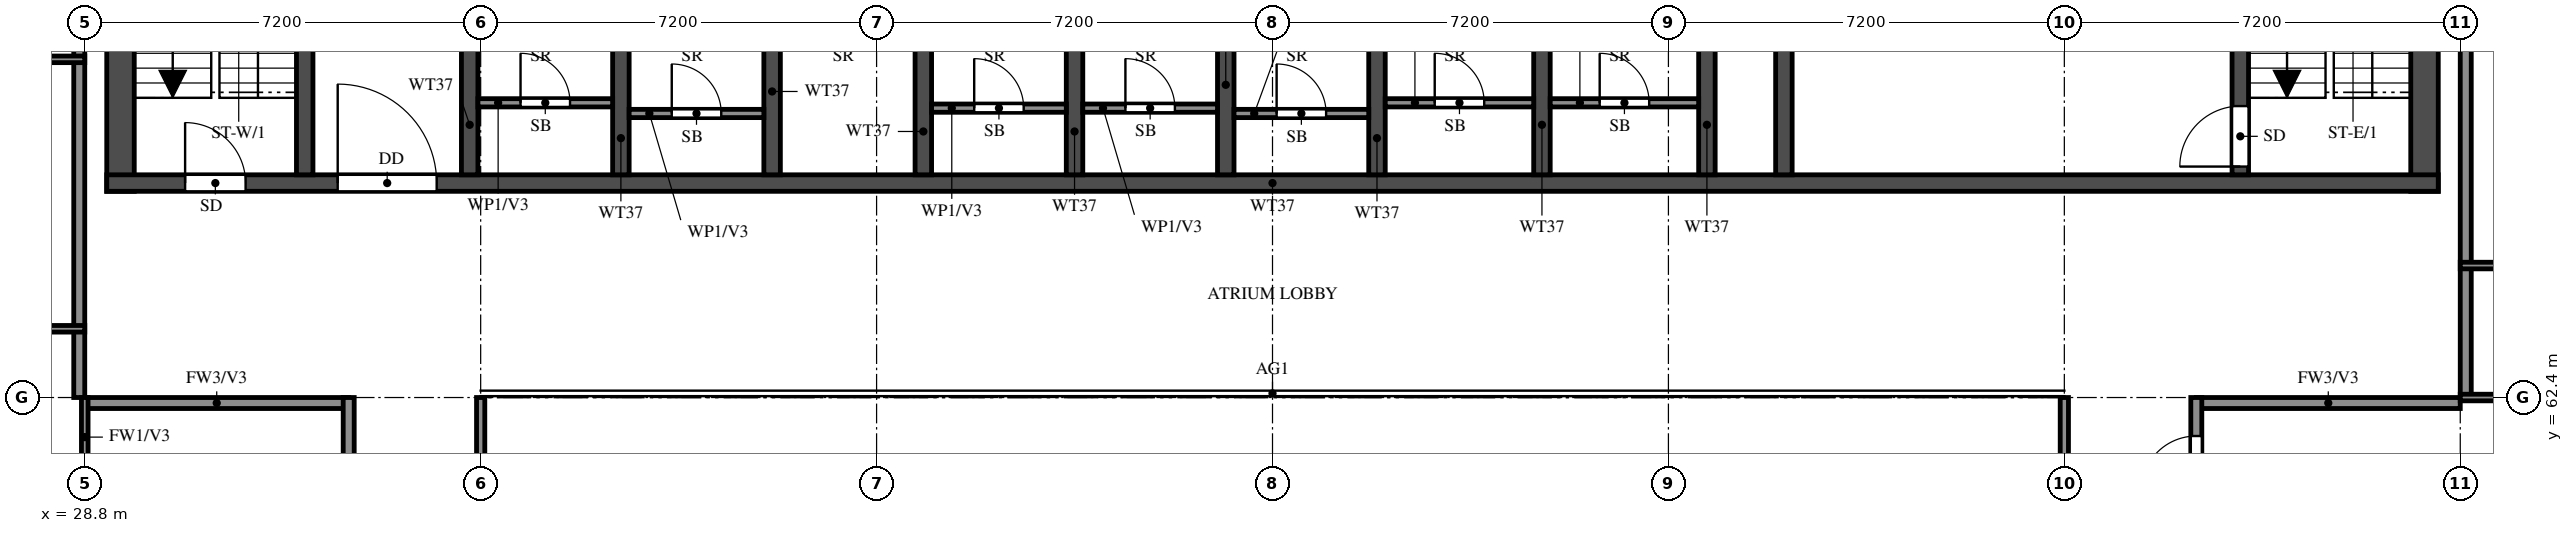
"""IFC4 building model, lengths in metres.
Left out: names, types, materials, properties, quantities, classifications, styles, units other than length and angle.
Written with IfcOpenShell. Run it as: python <this file> out.ifc"""

import sys

from ifc_helpers import new_model, si_unit, direction, frame, frame_2d, origin, place, context, subcontext, project, spatial, rectangle, extrude, element, fill, save


model = new_model("IFC4")
c1 = context("Model", 3, precision=1e-05, world=origin(), true_north=direction((0.0, 1.0)))
c2 = subcontext(c1, "Body", "Model", "MODEL_VIEW")
j1 = project(units=[si_unit("LENGTHUNIT", "METRE"), si_unit("PLANEANGLEUNIT", "RADIAN")], contexts=[c1])
p1 = place(None, origin())
s1 = spatial("IfcSite", under=j1, at=p1, CompositionType="ELEMENT")
p2 = place(p1, origin())
s2 = spatial("IfcBuilding", under=s1, at=p2, CompositionType="ELEMENT")
p3 = place(p2, frame((0.0, 0.0, 236.0)))
s3 = spatial("IfcBuildingStorey", under=s2, at=p3, CompositionType="ELEMENT", Elevation=236.0)
for number, where, z_axis, x_axis in (
    (1, (29.45, 66.15, 0.0), (0.0, 0.0, 1.0), (0.0, 1.0, 0.0)),
    (2, (71.35, 66.15, 0.0), (0.0, 0.0, 1.0), (0.0, 1.0, 0.0)),
):
    element("IfcWall", number, at=place(p3, frame(where, z_axis=z_axis, x_axis=x_axis)), inside=s3, PredefinedType="SHEAR", context=c2, shape_type="SweptSolid", body=[
        extrude(rectangle(XDim=11.85, YDim=0.5, at=frame_2d((5.925, 0.0))), origin(), (0.0, 0.0, 1.0), 3.22),
    ])
p4 = place(p3, frame((29.2, 66.3, 0.0), z_axis=(0.0, 0.0, 1.0), x_axis=(1.0, 0.0, 0.0)))
e3 = element("IfcWall", 3, at=p4, inside=s3, PredefinedType="SHEAR", context=c2, shape_type="SweptSolid", body=[
    extrude(rectangle(XDim=42.4, YDim=0.3, at=frame_2d((21.2, 0.0))), origin(), (0.0, 0.0, 1.0), 3.22),
])
p5 = place(p4, frame((1.425, 0.0, 0.0)))
e4 = element("IfcOpeningElement", 4, at=p5, cuts=e3, PredefinedType="OPENING", context=c2, shape_type="SweptSolid", body=[
    extrude(rectangle(XDim=1.1, YDim=2.1, at=frame_2d((0.55, 1.05))), frame((0.0, 0.16, 0.0), z_axis=(0.0, -1.0, 0.0), x_axis=(1.0, 0.0, 0.0)), (0.0, 0.0, 1.0), 0.32),
])
p6 = place(p4, frame((4.2, 0.0, 0.0)))
e5 = element("IfcOpeningElement", 5, at=p6, cuts=e3, PredefinedType="OPENING", context=c2, shape_type="SweptSolid", body=[
    extrude(rectangle(XDim=1.8, YDim=2.1, at=frame_2d((0.9, 1.05))), frame((0.0, 0.16, 0.0), z_axis=(0.0, -1.0, 0.0), x_axis=(1.0, 0.0, 0.0)), (0.0, 0.0, 1.0), 0.32),
])
p7 = place(p3, frame((32.8, 66.45, 0.0), z_axis=(0.0, 0.0, 1.0), x_axis=(0.0, 1.0, 0.0)))
e6 = element("IfcWall", 6, at=p7, inside=s3, PredefinedType="SHEAR", context=c2, shape_type="SweptSolid", body=[
    extrude(rectangle(XDim=11.05, YDim=0.3, at=frame_2d((5.525, 0.0))), origin(), (0.0, 0.0, 1.0), 3.22),
])
p8 = place(p3, frame((68.0, 66.45, 0.0), z_axis=(0.0, 0.0, 1.0), x_axis=(0.0, 1.0, 0.0)))
e7 = element("IfcWall", 7, at=p8, inside=s3, PredefinedType="SHEAR", context=c2, shape_type="SweptSolid", body=[
    extrude(rectangle(XDim=11.05, YDim=0.3, at=frame_2d((5.525, 0.0))), origin(), (0.0, 0.0, 1.0), 3.22),
])
p9 = place(p8, frame((0.15, 0.0, 0.0)))
e8 = element("IfcOpeningElement", 8, at=p9, cuts=e7, PredefinedType="OPENING", context=c2, shape_type="SweptSolid", body=[
    extrude(rectangle(XDim=1.1, YDim=2.1, at=frame_2d((0.55, 1.05))), frame((0.0, 0.16, 0.0), z_axis=(0.0, -1.0, 0.0), x_axis=(1.0, 0.0, 0.0)), (0.0, 0.0, 1.0), 0.32),
])
p10 = place(p3, frame((59.7, 66.45, 0.0), z_axis=(0.0, 0.0, 1.0), x_axis=(0.0, 1.0, 0.0)))
e9 = element("IfcWall", 9, at=p10, inside=s3, PredefinedType="SHEAR", context=c2, shape_type="SweptSolid", body=[
    extrude(rectangle(XDim=6.175, YDim=0.3, at=frame_2d((3.087, 0.0))), origin(), (0.0, 0.0, 1.0), 3.22),
])
p11 = place(p10, frame((3.85, 0.0, 0.0)))
e10 = element("IfcOpeningElement", 10, at=p11, cuts=e9, PredefinedType="OPENING", context=c2, shape_type="SweptSolid", body=[
    extrude(rectangle(XDim=1.2, YDim=2.1, at=frame_2d((0.6, 1.05))), frame((0.0, 0.16, 0.0), z_axis=(0.0, -1.0, 0.0), x_axis=(1.0, 0.0, 0.0)), (0.0, 0.0, 1.0), 0.32),
])
for number, where, z_axis, x_axis in (
    (11, (35.8, 66.45, 0.0), (0.0, 0.0, 1.0), (0.0, 1.0, 0.0)),
    (12, (38.55, 66.45, 0.0), (0.0, 0.0, 1.0), (0.0, 1.0, 0.0)),
    (13, (41.3, 66.45, 0.0), (0.0, 0.0, 1.0), (0.0, 1.0, 0.0)),
    (14, (44.05, 66.45, 0.0), (0.0, 0.0, 1.0), (0.0, 1.0, 0.0)),
    (15, (46.8, 66.45, 0.0), (0.0, 0.0, 1.0), (0.0, 1.0, 0.0)),
    (16, (49.55, 66.45, 0.0), (0.0, 0.0, 1.0), (0.0, 1.0, 0.0)),
    (17, (52.3, 66.45, 0.0), (0.0, 0.0, 1.0), (0.0, 1.0, 0.0)),
    (18, (55.3, 66.45, 0.0), (0.0, 0.0, 1.0), (0.0, 1.0, 0.0)),
    (19, (58.3, 66.45, 0.0), (0.0, 0.0, 1.0), (0.0, 1.0, 0.0)),
):
    element("IfcWall", number, at=place(p3, frame(where, z_axis=z_axis, x_axis=x_axis)), inside=s3, PredefinedType="SHEAR", context=c2, shape_type="SweptSolid", body=[
        extrude(rectangle(XDim=2.425, YDim=0.3, at=frame_2d((1.212, 0.0))), origin(), (0.0, 0.0, 1.0), 3.22),
    ])
p12 = place(p3, frame((35.95, 67.76, 0.0), z_axis=(0.0, 0.0, 1.0), x_axis=(1.0, 0.0, 0.0)))
e20 = element("IfcWall", 20, at=p12, inside=s3, PredefinedType="PARTITIONING", context=c2, shape_type="SweptSolid", body=[
    extrude(rectangle(XDim=2.45, YDim=0.15, at=frame_2d((1.225, 0.0))), origin(), (0.0, 0.0, 1.0), 3.22),
])
p13 = place(p12, frame((0.775, 0.0, 0.0)))
e21 = element("IfcOpeningElement", 21, at=p13, cuts=e20, PredefinedType="OPENING", context=c2, shape_type="SweptSolid", body=[
    extrude(rectangle(XDim=0.9, YDim=2.1, at=frame_2d((0.45, 1.05))), frame((0.0, 0.085, 0.0), z_axis=(0.0, -1.0, 0.0), x_axis=(1.0, 0.0, 0.0)), (0.0, 0.0, 1.0), 0.17),
])
p14 = place(p3, frame((38.7, 67.565, 0.0), z_axis=(0.0, 0.0, 1.0), x_axis=(1.0, 0.0, 0.0)))
e22 = element("IfcWall", 22, at=p14, inside=s3, PredefinedType="PARTITIONING", context=c2, shape_type="SweptSolid", body=[
    extrude(rectangle(XDim=2.45, YDim=0.15, at=frame_2d((1.225, 0.0))), origin(), (0.0, 0.0, 1.0), 3.22),
])
p15 = place(p14, frame((0.775, 0.0, 0.0)))
e23 = element("IfcOpeningElement", 23, at=p15, cuts=e22, PredefinedType="OPENING", context=c2, shape_type="SweptSolid", body=[
    extrude(rectangle(XDim=0.9, YDim=2.1, at=frame_2d((0.45, 1.05))), frame((0.0, 0.085, 0.0), z_axis=(0.0, -1.0, 0.0), x_axis=(1.0, 0.0, 0.0)), (0.0, 0.0, 1.0), 0.17),
])
p16 = place(p3, frame((44.2, 67.663, 0.0), z_axis=(0.0, 0.0, 1.0), x_axis=(1.0, 0.0, 0.0)))
e24 = element("IfcWall", 24, at=p16, inside=s3, PredefinedType="PARTITIONING", context=c2, shape_type="SweptSolid", body=[
    extrude(rectangle(XDim=2.45, YDim=0.15, at=frame_2d((1.225, 0.0))), origin(), (0.0, 0.0, 1.0), 3.22),
])
p17 = place(p16, frame((0.775, 0.0, 0.0)))
e25 = element("IfcOpeningElement", 25, at=p17, cuts=e24, PredefinedType="OPENING", context=c2, shape_type="SweptSolid", body=[
    extrude(rectangle(XDim=0.9, YDim=2.1, at=frame_2d((0.45, 1.05))), frame((0.0, 0.085, 0.0), z_axis=(0.0, -1.0, 0.0), x_axis=(1.0, 0.0, 0.0)), (0.0, 0.0, 1.0), 0.17),
])
p18 = place(p3, frame((46.95, 67.663, 0.0), z_axis=(0.0, 0.0, 1.0), x_axis=(1.0, 0.0, 0.0)))
e26 = element("IfcWall", 26, at=p18, inside=s3, PredefinedType="PARTITIONING", context=c2, shape_type="SweptSolid", body=[
    extrude(rectangle(XDim=2.45, YDim=0.15, at=frame_2d((1.225, 0.0))), origin(), (0.0, 0.0, 1.0), 3.22),
])
p19 = place(p18, frame((0.775, 0.0, 0.0)))
e27 = element("IfcOpeningElement", 27, at=p19, cuts=e26, PredefinedType="OPENING", context=c2, shape_type="SweptSolid", body=[
    extrude(rectangle(XDim=0.9, YDim=2.1, at=frame_2d((0.45, 1.05))), frame((0.0, 0.085, 0.0), z_axis=(0.0, -1.0, 0.0), x_axis=(1.0, 0.0, 0.0)), (0.0, 0.0, 1.0), 0.17),
])
p20 = place(p3, frame((49.7, 67.565, 0.0), z_axis=(0.0, 0.0, 1.0), x_axis=(1.0, 0.0, 0.0)))
e28 = element("IfcWall", 28, at=p20, inside=s3, PredefinedType="PARTITIONING", context=c2, shape_type="SweptSolid", body=[
    extrude(rectangle(XDim=2.45, YDim=0.15, at=frame_2d((1.225, 0.0))), origin(), (0.0, 0.0, 1.0), 3.22),
])
p21 = place(p20, frame((0.775, 0.0, 0.0)))
e29 = element("IfcOpeningElement", 29, at=p21, cuts=e28, PredefinedType="OPENING", context=c2, shape_type="SweptSolid", body=[
    extrude(rectangle(XDim=0.9, YDim=2.1, at=frame_2d((0.45, 1.05))), frame((0.0, 0.085, 0.0), z_axis=(0.0, -1.0, 0.0), x_axis=(1.0, 0.0, 0.0)), (0.0, 0.0, 1.0), 0.17),
])
p22 = place(p3, frame((52.45, 67.76, 0.0), z_axis=(0.0, 0.0, 1.0), x_axis=(1.0, 0.0, 0.0)))
e30 = element("IfcWall", 30, at=p22, inside=s3, PredefinedType="PARTITIONING", context=c2, shape_type="SweptSolid", body=[
    extrude(rectangle(XDim=2.7, YDim=0.15, at=frame_2d((1.35, 0.0))), origin(), (0.0, 0.0, 1.0), 3.22),
])
p23 = place(p22, frame((0.9, 0.0, 0.0)))
e31 = element("IfcOpeningElement", 31, at=p23, cuts=e30, PredefinedType="OPENING", context=c2, shape_type="SweptSolid", body=[
    extrude(rectangle(XDim=0.9, YDim=2.1, at=frame_2d((0.45, 1.05))), frame((0.0, 0.085, 0.0), z_axis=(0.0, -1.0, 0.0), x_axis=(1.0, 0.0, 0.0)), (0.0, 0.0, 1.0), 0.17),
])
p24 = place(p3, frame((55.45, 67.76, 0.0), z_axis=(0.0, 0.0, 1.0), x_axis=(1.0, 0.0, 0.0)))
e32 = element("IfcWall", 32, at=p24, inside=s3, PredefinedType="PARTITIONING", context=c2, shape_type="SweptSolid", body=[
    extrude(rectangle(XDim=2.7, YDim=0.15, at=frame_2d((1.35, 0.0))), origin(), (0.0, 0.0, 1.0), 3.22),
])
p25 = place(p24, frame((0.9, 0.0, 0.0)))
e33 = element("IfcOpeningElement", 33, at=p25, cuts=e32, PredefinedType="OPENING", context=c2, shape_type="SweptSolid", body=[
    extrude(rectangle(XDim=0.9, YDim=2.1, at=frame_2d((0.45, 1.05))), frame((0.0, 0.085, 0.0), z_axis=(0.0, -1.0, 0.0), x_axis=(1.0, 0.0, 0.0)), (0.0, 0.0, 1.0), 0.17),
])
for number, where, z_axis, x_axis in (
    (34, (28.8, 62.3, 0.0), (0.0, 0.0, 1.0), (1.0, 0.0, 0.0)),
    (35, (67.2, 62.3, 0.0), (0.0, 0.0, 1.0), (1.0, 0.0, 0.0)),
):
    element("IfcWall", number, at=place(p3, frame(where, z_axis=z_axis, x_axis=x_axis)), inside=s3, PredefinedType="SOLIDWALL", context=c2, shape_type="SweptSolid", body=[
        extrude(rectangle(XDim=4.8, YDim=0.2, at=frame_2d((2.4, 0.0))), origin(), (0.0, 0.0, 1.0), 3.22),
    ])
p26 = place(p3, frame((28.7, 62.4, 0.0), z_axis=(0.0, 0.0, 1.0), x_axis=(0.0, 1.0, 0.0)))
e36 = element("IfcWall", 36, at=p26, inside=s3, PredefinedType="SOLIDWALL", context=c2, shape_type="SweptSolid", body=[
    extrude(rectangle(XDim=15.6, YDim=0.2, at=frame_2d((7.8, 0.0))), origin(), (0.0, 0.0, 1.0), 3.22),
])
p27 = place(p3, frame((33.6, 50.4, 0.0), z_axis=(0.0, 0.0, 1.0), x_axis=(0.0, 1.0, 0.0)))
e37 = element("IfcWall", 37, at=p27, inside=s3, PredefinedType="SOLIDWALL", context=c2, shape_type="SweptSolid", body=[
    extrude(rectangle(XDim=12.0, YDim=0.2, at=frame_2d((6.0, 0.0))), origin(), (0.0, 0.0, 1.0), 3.22),
])
p28 = place(p27, frame((0.7, 0.0, 0.0)))
e38 = element("IfcOpeningElement", 38, at=p28, cuts=e37, PredefinedType="OPENING", context=c2, shape_type="SweptSolid", body=[
    extrude(rectangle(XDim=1.0, YDim=2.1, at=frame_2d((0.5, 1.05))), frame((0.0, 0.11, 0.0), z_axis=(0.0, -1.0, 0.0), x_axis=(1.0, 0.0, 0.0)), (0.0, 0.0, 1.0), 0.22),
])
p29 = place(p27, frame((9.7, 0.0, 0.0)))
e39 = element("IfcOpeningElement", 39, at=p29, cuts=e37, PredefinedType="OPENING", context=c2, shape_type="SweptSolid", body=[
    extrude(rectangle(XDim=1.0, YDim=2.1, at=frame_2d((0.5, 1.05))), frame((0.0, 0.11, 0.0), z_axis=(0.0, -1.0, 0.0), x_axis=(1.0, 0.0, 0.0)), (0.0, 0.0, 1.0), 0.22),
])
p30 = place(p3, frame((67.2, 45.6, 0.0), z_axis=(0.0, 0.0, 1.0), x_axis=(0.0, 1.0, 0.0)))
e40 = element("IfcWall", 40, at=p30, inside=s3, PredefinedType="SOLIDWALL", context=c2, shape_type="SweptSolid", body=[
    extrude(rectangle(XDim=16.8, YDim=0.2, at=frame_2d((8.4, 0.0))), origin(), (0.0, 0.0, 1.0), 3.22),
])
p31 = place(p30, frame((6.7, 0.0, 0.0)))
e41 = element("IfcOpeningElement", 41, at=p31, cuts=e40, PredefinedType="OPENING", context=c2, shape_type="SweptSolid", body=[
    extrude(rectangle(XDim=1.0, YDim=2.1, at=frame_2d((0.5, 1.05))), frame((0.0, 0.11, 0.0), z_axis=(0.0, -1.0, 0.0), x_axis=(1.0, 0.0, 0.0)), (0.0, 0.0, 1.0), 0.22),
])
p32 = place(p30, frame((15.1, 0.0, 0.0)))
e42 = element("IfcOpeningElement", 42, at=p32, cuts=e40, PredefinedType="OPENING", context=c2, shape_type="SweptSolid", body=[
    extrude(rectangle(XDim=1.0, YDim=2.1, at=frame_2d((0.5, 1.05))), frame((0.0, 0.11, 0.0), z_axis=(0.0, -1.0, 0.0), x_axis=(1.0, 0.0, 0.0)), (0.0, 0.0, 1.0), 0.22),
])
p33 = place(p30, frame((0.7, 0.0, 0.0)))
e43 = element("IfcOpeningElement", 43, at=p33, cuts=e40, PredefinedType="OPENING", context=c2, shape_type="SweptSolid", body=[
    extrude(rectangle(XDim=1.0, YDim=2.1, at=frame_2d((0.5, 1.05))), frame((0.0, 0.11, 0.0), z_axis=(0.0, -1.0, 0.0), x_axis=(1.0, 0.0, 0.0)), (0.0, 0.0, 1.0), 0.22),
])
p34 = place(p3, frame((72.1, 62.4, 0.0), z_axis=(0.0, 0.0, 1.0), x_axis=(0.0, 1.0, 0.0)))
e44 = element("IfcWall", 44, at=p34, inside=s3, PredefinedType="SOLIDWALL", context=c2, shape_type="SweptSolid", body=[
    extrude(rectangle(XDim=15.6, YDim=0.2, at=frame_2d((7.8, 0.0))), origin(), (0.0, 0.0, 1.0), 3.22),
])
p35 = place(p3, frame((72.0, 62.4, 0.0), z_axis=(0.0, 0.0, 1.0), x_axis=(1.0, 0.0, 0.0)))
e45 = element("IfcWall", 45, at=p35, inside=s3, PredefinedType="PARTITIONING", context=c2, shape_type="SweptSolid", body=[
    extrude(rectangle(XDim=2.4, YDim=0.12, at=frame_2d((1.2, 0.0))), origin(), (0.0, 0.0, 1.0), 3.22),
])
p36 = place(p35, frame((0.75, 0.0, 0.0)))
e46 = element("IfcOpeningElement", 46, at=p36, cuts=e45, PredefinedType="OPENING", context=c2, shape_type="SweptSolid", body=[
    extrude(rectangle(XDim=0.9, YDim=2.1, at=frame_2d((0.45, 1.05))), frame((0.0, 0.07, 0.0), z_axis=(0.0, -1.0, 0.0), x_axis=(1.0, 0.0, 0.0)), (0.0, 0.0, 1.0), 0.14),
])
for number, where, z_axis, x_axis in (
    (47, (25.3, 63.65, 0.0), (0.0, 0.0, 1.0), (1.0, 0.0, 0.0)),
    (48, (72.0, 64.8, 0.0), (0.0, 0.0, 1.0), (1.0, 0.0, 0.0)),
    (49, (25.3, 68.55, 0.0), (0.0, 0.0, 1.0), (1.0, 0.0, 0.0)),
):
    element("IfcWall", number, at=place(p3, frame(where, z_axis=z_axis, x_axis=x_axis)), inside=s3, PredefinedType="PARTITIONING", context=c2, shape_type="SweptSolid", body=[
        extrude(rectangle(XDim=3.5, YDim=0.12, at=frame_2d((1.75, 0.0))), origin(), (0.0, 0.0, 1.0), 3.22),
    ])
p37 = place(p3, frame((28.8, 58.8, 0.0), z_axis=(0.0, 0.0, 1.0), x_axis=(0.0, 1.0, 0.0)))
e50 = element("IfcWall", 50, at=p37, inside=s3, PredefinedType="PARTITIONING", context=c2, shape_type="SweptSolid", body=[
    extrude(rectangle(XDim=3.6, YDim=0.12, at=frame_2d((1.8, 0.0))), origin(), (0.0, 0.0, 1.0), 3.22),
])
p38 = place(p37, frame((0.75, 0.0, 0.0)))
e51 = element("IfcOpeningElement", 51, at=p38, cuts=e50, PredefinedType="OPENING", context=c2, shape_type="SweptSolid", body=[
    extrude(rectangle(XDim=0.9, YDim=2.1, at=frame_2d((0.45, 1.05))), frame((0.0, 0.07, 0.0), z_axis=(0.0, -1.0, 0.0), x_axis=(1.0, 0.0, 0.0)), (0.0, 0.0, 1.0), 0.14),
])
for number, where, z_axis, x_axis in (
    (52, (36.0, 48.0, 0.0), (0.0, 0.0, 1.0), (0.0, 1.0, 0.0)),
    (53, (64.8, 48.0, 0.0), (0.0, 0.0, 1.0), (0.0, 1.0, 0.0)),
):
    element("IfcWall", number, at=place(p3, frame(where, z_axis=z_axis, x_axis=x_axis)), inside=s3, PredefinedType="SOLIDWALL", context=c2, shape_type="SweptSolid", body=[
        extrude(rectangle(XDim=14.4, YDim=0.15, at=frame_2d((7.2, 0.0))), origin(), (0.0, 0.0, 1.0), 2.32),
    ])
p39 = place(p5, origin())
e54 = element("IfcDoor", 54, at=p39, inside=s3, OperationType="SINGLE_SWING_LEFT", PredefinedType="DOOR", context=c2, shape_type="SweptSolid", body=[
    extrude(rectangle(XDim=1.1, YDim=2.1, at=frame_2d((0.55, 1.05))), frame((0.0, 0.025, 0.0), z_axis=(0.0, -1.0, 0.0), x_axis=(1.0, 0.0, 0.0)), (0.0, 0.0, 1.0), 0.05),
])
fill(e4, e54)
p40 = place(p9, origin())
e55 = element("IfcDoor", 55, at=p40, inside=s3, OperationType="SINGLE_SWING_RIGHT", PredefinedType="DOOR", context=c2, shape_type="SweptSolid", body=[
    extrude(rectangle(XDim=1.1, YDim=2.1, at=frame_2d((0.55, 1.05))), frame((0.0, 0.025, 0.0), z_axis=(0.0, -1.0, 0.0), x_axis=(1.0, 0.0, 0.0)), (0.0, 0.0, 1.0), 0.05),
])
fill(e8, e55)
p41 = place(p6, origin())
e56 = element("IfcDoor", 56, at=p41, inside=s3, OperationType="DOUBLE_DOOR_SINGLE_SWING", PredefinedType="DOOR", context=c2, shape_type="SweptSolid", body=[
    extrude(rectangle(XDim=1.8, YDim=2.1, at=frame_2d((0.9, 1.05))), frame((0.0, 0.025, 0.0), z_axis=(0.0, -1.0, 0.0), x_axis=(1.0, 0.0, 0.0)), (0.0, 0.0, 1.0), 0.05),
])
fill(e5, e56)
p42 = place(p13, origin())
e57 = element("IfcDoor", 57, at=p42, inside=s3, OperationType="SINGLE_SWING_LEFT", PredefinedType="DOOR", context=c2, shape_type="SweptSolid", body=[
    extrude(rectangle(XDim=0.9, YDim=2.1, at=frame_2d((0.45, 1.05))), frame((0.0, 0.025, 0.0), z_axis=(0.0, -1.0, 0.0), x_axis=(1.0, 0.0, 0.0)), (0.0, 0.0, 1.0), 0.05),
])
fill(e21, e57)
p43 = place(p15, origin())
e58 = element("IfcDoor", 58, at=p43, inside=s3, OperationType="SINGLE_SWING_LEFT", PredefinedType="DOOR", context=c2, shape_type="SweptSolid", body=[
    extrude(rectangle(XDim=0.9, YDim=2.1, at=frame_2d((0.45, 1.05))), frame((0.0, 0.025, 0.0), z_axis=(0.0, -1.0, 0.0), x_axis=(1.0, 0.0, 0.0)), (0.0, 0.0, 1.0), 0.05),
])
fill(e23, e58)
p44 = place(p17, origin())
e59 = element("IfcDoor", 59, at=p44, inside=s3, OperationType="SINGLE_SWING_LEFT", PredefinedType="DOOR", context=c2, shape_type="SweptSolid", body=[
    extrude(rectangle(XDim=0.9, YDim=2.1, at=frame_2d((0.45, 1.05))), frame((0.0, 0.025, 0.0), z_axis=(0.0, -1.0, 0.0), x_axis=(1.0, 0.0, 0.0)), (0.0, 0.0, 1.0), 0.05),
])
fill(e25, e59)
p45 = place(p19, origin())
e60 = element("IfcDoor", 60, at=p45, inside=s3, OperationType="SINGLE_SWING_RIGHT", PredefinedType="DOOR", context=c2, shape_type="SweptSolid", body=[
    extrude(rectangle(XDim=0.9, YDim=2.1, at=frame_2d((0.45, 1.05))), frame((0.0, 0.025, 0.0), z_axis=(0.0, -1.0, 0.0), x_axis=(1.0, 0.0, 0.0)), (0.0, 0.0, 1.0), 0.05),
])
fill(e27, e60)
p46 = place(p21, origin())
e61 = element("IfcDoor", 61, at=p46, inside=s3, OperationType="SINGLE_SWING_LEFT", PredefinedType="DOOR", context=c2, shape_type="SweptSolid", body=[
    extrude(rectangle(XDim=0.9, YDim=2.1, at=frame_2d((0.45, 1.05))), frame((0.0, 0.025, 0.0), z_axis=(0.0, -1.0, 0.0), x_axis=(1.0, 0.0, 0.0)), (0.0, 0.0, 1.0), 0.05),
])
fill(e29, e61)
p47 = place(p23, origin())
e62 = element("IfcDoor", 62, at=p47, inside=s3, OperationType="SINGLE_SWING_LEFT", PredefinedType="DOOR", context=c2, shape_type="SweptSolid", body=[
    extrude(rectangle(XDim=0.9, YDim=2.1, at=frame_2d((0.45, 1.05))), frame((0.0, 0.025, 0.0), z_axis=(0.0, -1.0, 0.0), x_axis=(1.0, 0.0, 0.0)), (0.0, 0.0, 1.0), 0.05),
])
fill(e31, e62)
p48 = place(p25, origin())
e63 = element("IfcDoor", 63, at=p48, inside=s3, OperationType="SINGLE_SWING_LEFT", PredefinedType="DOOR", context=c2, shape_type="SweptSolid", body=[
    extrude(rectangle(XDim=0.9, YDim=2.1, at=frame_2d((0.45, 1.05))), frame((0.0, 0.025, 0.0), z_axis=(0.0, -1.0, 0.0), x_axis=(1.0, 0.0, 0.0)), (0.0, 0.0, 1.0), 0.05),
])
fill(e33, e63)
p49 = place(p32, origin())
e64 = element("IfcDoor", 64, at=p49, inside=s3, OperationType="SINGLE_SWING_RIGHT", PredefinedType="DOOR", context=c2, shape_type="SweptSolid", body=[
    extrude(rectangle(XDim=1.0, YDim=2.1, at=frame_2d((0.5, 1.05))), frame((0.0, 0.025, 0.0), z_axis=(0.0, -1.0, 0.0), x_axis=(1.0, 0.0, 0.0)), (0.0, 0.0, 1.0), 0.05),
])
fill(e42, e64)
save(model, sys.argv[1])
